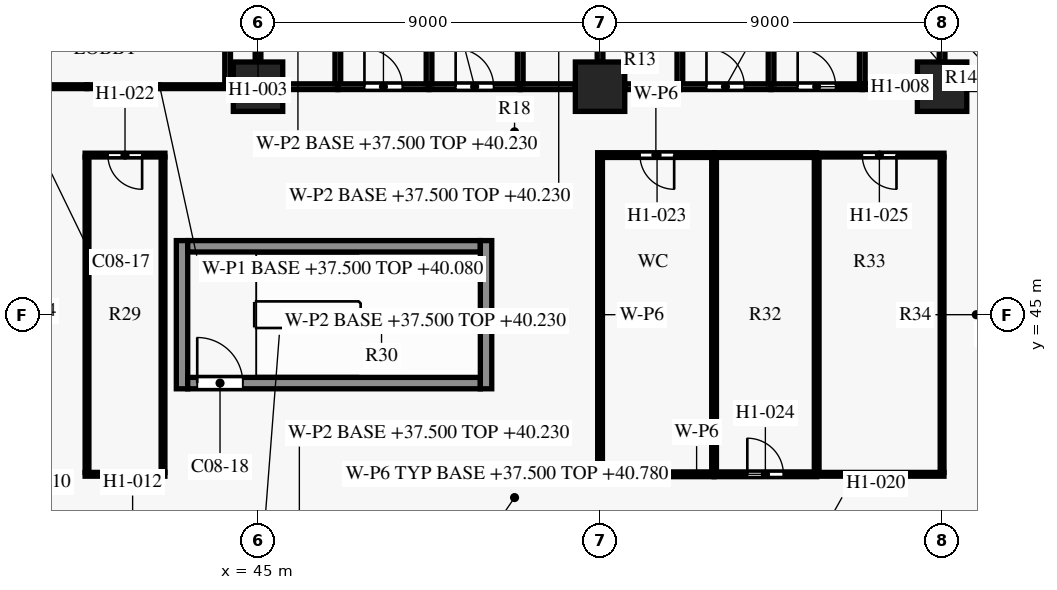
"""IFC4 building model, lengths in metres.
Left out: names, types, materials, properties, quantities, classifications, styles, units other than length and angle.
Written with IfcOpenShell. Run it as: python <this file> out.ifc"""

import sys

from ifc_helpers import new_model, si_unit, direction, frame, frame_2d, origin, origin_2d, place, context, subcontext, project, spatial, rectangle, extrude, element, fill, save


model = new_model("IFC4")
c1 = context("Model", 3, precision=1e-05, world=origin(), true_north=direction((0.0, 1.0)))
c2 = subcontext(c1, "Body", "Model", "MODEL_VIEW")
j1 = project(units=[si_unit("LENGTHUNIT", "METRE"), si_unit("PLANEANGLEUNIT", "RADIAN")], contexts=[c1])
p1 = place(None, origin())
s1 = spatial("IfcSite", under=j1, at=p1, CompositionType="ELEMENT")
p2 = place(p1, origin())
s2 = spatial("IfcBuilding", under=s1, at=p2, CompositionType="ELEMENT")
p3 = place(p2, frame((0.0, 0.0, 37.5)))
s3 = spatial("IfcBuildingStorey", under=s2, at=p3, CompositionType="ELEMENT", Elevation=37.5)
for number, where, z_axis, x_axis in (
    (1, (45.0, 51.0, 0.0), (0.0, 0.0, 1.0), (1.0, 0.0, 0.0)),
    (2, (54.0, 51.0, 0.0), (0.0, 0.0, 1.0), (1.0, 0.0, 0.0)),
    (3, (63.0, 51.0, 0.0), (0.0, 0.0, 1.0), (1.0, 0.0, 0.0)),
):
    element("IfcColumn", number, at=place(p3, frame(where, z_axis=z_axis, x_axis=x_axis)), inside=s3, PredefinedType="COLUMN", context=c2, shape_type="SweptSolid", body=[
        extrude(rectangle(XDim=1.3, YDim=1.3, at=origin_2d()), origin(), (0.0, 0.0, 1.0), 3.6),
    ])
p4 = place(p3, frame((43.15, 43.2, 0.0), z_axis=(0.0, 0.0, 1.0), x_axis=(1.0, 0.0, 0.0)))
e4 = element("IfcWall", 4, at=p4, inside=s3, PredefinedType="SHEAR", context=c2, shape_type="SweptSolid", body=[
    extrude(rectangle(XDim=7.7, YDim=0.3, at=frame_2d((3.85, 0.0))), origin(), (0.0, 0.0, 1.0), 3.3),
])
p5 = place(p4, frame((0.25, 0.0, 0.0)))
e5 = element("IfcOpeningElement", 5, at=p5, cuts=e4, PredefinedType="OPENING", context=c2, shape_type="SweptSolid", body=[
    extrude(rectangle(XDim=1.2, YDim=2.2, at=frame_2d((0.6, 1.1))), frame((0.0, 0.16, 0.0), z_axis=(0.0, -1.0, 0.0), x_axis=(1.0, 0.0, 0.0)), (0.0, 0.0, 1.0), 0.32),
])
p6 = place(p3, frame((43.15, 46.8, 0.0), z_axis=(0.0, 0.0, 1.0), x_axis=(1.0, 0.0, 0.0)))
e6 = element("IfcWall", 6, at=p6, inside=s3, PredefinedType="SHEAR", context=c2, shape_type="SweptSolid", body=[
    extrude(rectangle(XDim=7.7, YDim=0.3, at=frame_2d((3.85, 0.0))), origin(), (0.0, 0.0, 1.0), 3.3),
])
for number, where, z_axis, x_axis in (
    (7, (43.0, 43.05, 0.0), (0.0, 0.0, 1.0), (0.0, 1.0, 0.0)),
    (8, (51.0, 43.05, 0.0), (0.0, 0.0, 1.0), (0.0, 1.0, 0.0)),
):
    element("IfcWall", number, at=place(p3, frame(where, z_axis=z_axis, x_axis=x_axis)), inside=s3, PredefinedType="SHEAR", context=c2, shape_type="SweptSolid", body=[
        extrude(rectangle(XDim=3.9, YDim=0.3, at=frame_2d((1.95, 0.0))), origin(), (0.0, 0.0, 1.0), 3.3),
    ])
p7 = place(p3, frame((40.45, 40.8, 0.0), z_axis=(0.0, 0.0, 1.0), x_axis=(1.0, 0.0, 0.0)))
e9 = element("IfcWall", 9, at=p7, inside=s3, PredefinedType="PARTITIONING", context=c2, shape_type="SweptSolid", body=[
    extrude(rectangle(XDim=2.1, YDim=0.1, at=frame_2d((1.05, 0.0))), origin(), (0.0, 0.0, 1.0), 3.28),
])
p8 = place(p3, frame((53.938, 40.8, 0.0), z_axis=(0.0, 0.0, 1.0), x_axis=(1.0, 0.0, 0.0)))
e10 = element("IfcWall", 10, at=p8, inside=s3, PredefinedType="PARTITIONING", context=c2, shape_type="SweptSolid", body=[
    extrude(rectangle(XDim=3.062, YDim=0.125, at=frame_2d((1.531, 0.0))), origin(), (0.0, 0.0, 1.0), 2.73),
])
p9 = place(p3, frame((57.0, 40.8, 0.0), z_axis=(0.0, 0.0, 1.0), x_axis=(1.0, 0.0, 0.0)))
e11 = element("IfcWall", 11, at=p9, inside=s3, PredefinedType="PARTITIONING", context=c2, shape_type="SweptSolid", body=[
    extrude(rectangle(XDim=2.7, YDim=0.125, at=frame_2d((1.35, 0.0))), origin(), (0.0, 0.0, 1.0), 3.28),
])
p10 = place(p9, frame((0.875, 0.0, 0.0)))
e12 = element("IfcOpeningElement", 12, at=p10, cuts=e11, PredefinedType="OPENING", context=c2, shape_type="SweptSolid", body=[
    extrude(rectangle(XDim=0.95, YDim=2.1, at=frame_2d((0.475, 1.05))), frame((0.0, 0.073, 0.0), z_axis=(0.0, -1.0, 0.0), x_axis=(1.0, 0.0, 0.0)), (0.0, 0.0, 1.0), 0.145),
])
p11 = place(p3, frame((59.7, 40.8, 0.0), z_axis=(0.0, 0.0, 1.0), x_axis=(1.0, 0.0, 0.0)))
e13 = element("IfcWall", 13, at=p11, inside=s3, PredefinedType="PARTITIONING", context=c2, shape_type="SweptSolid", body=[
    extrude(rectangle(XDim=3.35, YDim=0.1, at=frame_2d((1.675, 0.0))), origin(), (0.0, 0.0, 1.0), 2.73),
])
p12 = place(p3, frame((63.0, 40.85, 0.0), z_axis=(0.0, 0.0, 1.0), x_axis=(0.0, 1.0, 0.0)))
e14 = element("IfcWall", 14, at=p12, inside=s3, PredefinedType="PARTITIONING", context=c2, shape_type="SweptSolid", body=[
    extrude(rectangle(XDim=8.3, YDim=0.1, at=frame_2d((4.15, 0.0))), origin(), (0.0, 0.0, 1.0), 2.73),
])
p13 = place(p3, frame((54.0, 49.137, 0.0), z_axis=(0.0, 0.0, 1.0), x_axis=(0.0, -1.0, 0.0)))
e15 = element("IfcWall", 15, at=p13, inside=s3, PredefinedType="PARTITIONING", context=c2, shape_type="SweptSolid", body=[
    extrude(rectangle(XDim=8.275, YDim=0.125, at=frame_2d((4.137, 0.0))), origin(), (0.0, 0.0, 1.0), 2.73),
])
for number, where, z_axis, x_axis in (
    (16, (57.0, 49.137, 0.0), (0.0, 0.0, 1.0), (0.0, -1.0, 0.0)),
    (17, (59.7, 49.137, 0.0), (0.0, 0.0, 1.0), (0.0, -1.0, 0.0)),
):
    element("IfcWall", number, at=place(p3, frame(where, z_axis=z_axis, x_axis=x_axis)), inside=s3, PredefinedType="PARTITIONING", context=c2, shape_type="SweptSolid", body=[
        extrude(rectangle(XDim=8.275, YDim=0.125, at=frame_2d((4.137, 0.0))), origin(), (0.0, 0.0, 1.0), 3.28),
    ])
for number, where, z_axis, x_axis in (
    (18, (40.5, 49.15, 0.0), (0.0, 0.0, 1.0), (0.0, -1.0, 0.0)),
    (19, (42.5, 49.15, 0.0), (0.0, 0.0, 1.0), (0.0, -1.0, 0.0)),
):
    element("IfcWall", number, at=place(p3, frame(where, z_axis=z_axis, x_axis=x_axis)), inside=s3, PredefinedType="PARTITIONING", context=c2, shape_type="SweptSolid", body=[
        extrude(rectangle(XDim=8.3, YDim=0.1, at=frame_2d((4.15, 0.0))), origin(), (0.0, 0.0, 1.0), 3.28),
    ])
p14 = place(p3, frame((42.55, 49.2, 0.0), z_axis=(0.0, 0.0, 1.0), x_axis=(-1.0, 0.0, 0.0)))
e20 = element("IfcWall", 20, at=p14, inside=s3, PredefinedType="PARTITIONING", context=c2, shape_type="SweptSolid", body=[
    extrude(rectangle(XDim=2.1, YDim=0.1, at=frame_2d((1.05, 0.0))), origin(), (0.0, 0.0, 1.0), 3.28),
])
p15 = place(p14, frame((0.6, 0.0, 0.0)))
e21 = element("IfcOpeningElement", 21, at=p15, cuts=e20, PredefinedType="OPENING", context=c2, shape_type="SweptSolid", body=[
    extrude(rectangle(XDim=0.9, YDim=2.1, at=frame_2d((0.45, 1.05))), frame((0.0, 0.06, 0.0), z_axis=(0.0, -1.0, 0.0), x_axis=(1.0, 0.0, 0.0)), (0.0, 0.0, 1.0), 0.12),
])
p16 = place(p3, frame((57.0, 49.2, 0.0), z_axis=(0.0, 0.0, 1.0), x_axis=(-1.0, 0.0, 0.0)))
e22 = element("IfcWall", 22, at=p16, inside=s3, PredefinedType="PARTITIONING", context=c2, shape_type="SweptSolid", body=[
    extrude(rectangle(XDim=3.062, YDim=0.125, at=frame_2d((1.531, 0.0))), origin(), (0.0, 0.0, 1.0), 2.73),
])
p17 = place(p16, frame((1.05, 0.0, 0.0)))
e23 = element("IfcOpeningElement", 23, at=p17, cuts=e22, PredefinedType="OPENING", context=c2, shape_type="SweptSolid", body=[
    extrude(rectangle(XDim=0.9, YDim=2.1, at=frame_2d((0.45, 1.05))), frame((0.0, 0.073, 0.0), z_axis=(0.0, -1.0, 0.0), x_axis=(1.0, 0.0, 0.0)), (0.0, 0.0, 1.0), 0.145),
])
p18 = place(p3, frame((59.7, 49.2, 0.0), z_axis=(0.0, 0.0, 1.0), x_axis=(-1.0, 0.0, 0.0)))
e24 = element("IfcWall", 24, at=p18, inside=s3, PredefinedType="PARTITIONING", context=c2, shape_type="SweptSolid", body=[
    extrude(rectangle(XDim=2.7, YDim=0.125, at=frame_2d((1.35, 0.0))), origin(), (0.0, 0.0, 1.0), 3.28),
])
p19 = place(p3, frame((63.05, 49.2, 0.0), z_axis=(0.0, 0.0, 1.0), x_axis=(-1.0, 0.0, 0.0)))
e25 = element("IfcWall", 25, at=p19, inside=s3, PredefinedType="PARTITIONING", context=c2, shape_type="SweptSolid", body=[
    extrude(rectangle(XDim=3.35, YDim=0.1, at=frame_2d((1.675, 0.0))), origin(), (0.0, 0.0, 1.0), 2.73),
])
p20 = place(p19, frame((1.25, 0.0, 0.0)))
e26 = element("IfcOpeningElement", 26, at=p20, cuts=e25, PredefinedType="OPENING", context=c2, shape_type="SweptSolid", body=[
    extrude(rectangle(XDim=0.9, YDim=2.1, at=frame_2d((0.45, 1.05))), frame((0.0, 0.06, 0.0), z_axis=(0.0, -1.0, 0.0), x_axis=(1.0, 0.0, 0.0)), (0.0, 0.0, 1.0), 0.12),
])
p21 = place(p3, frame((40.5, 51.0, 0.0), z_axis=(0.0, 0.0, 1.0), x_axis=(-1.0, 0.0, 0.0)))
e27 = element("IfcWall", 27, at=p21, inside=s3, PredefinedType="PARTITIONING", context=c2, shape_type="SweptSolid", body=[
    extrude(rectangle(XDim=3.845, YDim=0.1, at=frame_2d((1.922, 0.0))), origin(), (0.0, 0.0, 1.0), 2.58),
])
p22 = place(p21, frame((1.8, 0.0, 0.0)))
e28 = element("IfcOpeningElement", 28, at=p22, cuts=e27, PredefinedType="OPENING", context=c2, shape_type="SweptSolid", body=[
    extrude(rectangle(XDim=0.9, YDim=2.1, at=frame_2d((0.45, 1.05))), frame((0.0, 0.06, 0.0), z_axis=(0.0, -1.0, 0.0), x_axis=(1.0, 0.0, 0.0)), (0.0, 0.0, 1.0), 0.12),
])
p23 = place(p3, frame((44.33, 51.0, 0.0), z_axis=(0.0, 0.0, 1.0), x_axis=(-1.0, 0.0, 0.0)))
e29 = element("IfcWall", 29, at=p23, inside=s3, PredefinedType="PARTITIONING", context=c2, shape_type="SweptSolid", body=[
    extrude(rectangle(XDim=3.83, YDim=0.1, at=frame_2d((1.915, 0.0))), origin(), (0.0, 0.0, 1.0), 2.58),
])
p24 = place(p3, frame((45.655, 51.0, 0.0), z_axis=(0.0, 0.0, 1.0), x_axis=(1.0, 0.0, 0.0)))
e30 = element("IfcWall", 30, at=p24, inside=s3, PredefinedType="PARTITIONING", context=c2, shape_type="SweptSolid", body=[
    extrude(rectangle(XDim=1.445, YDim=0.15, at=frame_2d((0.723, 0.0))), origin(), (0.0, 0.0, 1.0), 2.58),
])
p25 = place(p3, frame((47.1, 51.0, 0.0), z_axis=(0.0, 0.0, 1.0), x_axis=(1.0, 0.0, 0.0)))
e31 = element("IfcWall", 31, at=p25, inside=s3, PredefinedType="PARTITIONING", context=c2, shape_type="SweptSolid", body=[
    extrude(rectangle(XDim=2.4, YDim=0.15, at=frame_2d((1.2, 0.0))), origin(), (0.0, 0.0, 1.0), 2.58),
])
p26 = place(p25, frame((0.7, 0.0, 0.0)))
e32 = element("IfcOpeningElement", 32, at=p26, cuts=e31, PredefinedType="OPENING", context=c2, shape_type="SweptSolid", body=[
    extrude(rectangle(XDim=1.0, YDim=2.1, at=frame_2d((0.5, 1.05))), frame((0.0, 0.085, 0.0), z_axis=(0.0, -1.0, 0.0), x_axis=(1.0, 0.0, 0.0)), (0.0, 0.0, 1.0), 0.17),
])
p27 = place(p3, frame((49.5, 51.0, 0.0), z_axis=(0.0, 0.0, 1.0), x_axis=(1.0, 0.0, 0.0)))
e33 = element("IfcWall", 33, at=p27, inside=s3, PredefinedType="PARTITIONING", context=c2, shape_type="SweptSolid", body=[
    extrude(rectangle(XDim=2.4, YDim=0.15, at=frame_2d((1.2, 0.0))), origin(), (0.0, 0.0, 1.0), 2.58),
])
p28 = place(p27, frame((0.7, 0.0, 0.0)))
e34 = element("IfcOpeningElement", 34, at=p28, cuts=e33, PredefinedType="OPENING", context=c2, shape_type="SweptSolid", body=[
    extrude(rectangle(XDim=1.0, YDim=2.1, at=frame_2d((0.5, 1.05))), frame((0.0, 0.085, 0.0), z_axis=(0.0, -1.0, 0.0), x_axis=(1.0, 0.0, 0.0)), (0.0, 0.0, 1.0), 0.17),
])
for number, where, z_axis, x_axis in (
    (35, (51.9, 51.0, 0.0), (0.0, 0.0, 1.0), (1.0, 0.0, 0.0)),
    (36, (54.655, 51.0, 0.0), (0.0, 0.0, 1.0), (1.0, 0.0, 0.0)),
):
    element("IfcWall", number, at=place(p3, frame(where, z_axis=z_axis, x_axis=x_axis)), inside=s3, PredefinedType="PARTITIONING", context=c2, shape_type="SweptSolid", body=[
        extrude(rectangle(XDim=1.445, YDim=0.15, at=frame_2d((0.723, 0.0))), origin(), (0.0, 0.0, 1.0), 2.58),
    ])
p29 = place(p3, frame((56.1, 51.0, 0.0), z_axis=(0.0, 0.0, 1.0), x_axis=(1.0, 0.0, 0.0)))
e37 = element("IfcWall", 37, at=p29, inside=s3, PredefinedType="PARTITIONING", context=c2, shape_type="SweptSolid", body=[
    extrude(rectangle(XDim=2.4, YDim=0.15, at=frame_2d((1.2, 0.0))), origin(), (0.0, 0.0, 1.0), 2.58),
])
p30 = place(p29, frame((0.7, 0.0, 0.0)))
e38 = element("IfcOpeningElement", 38, at=p30, cuts=e37, PredefinedType="OPENING", context=c2, shape_type="SweptSolid", body=[
    extrude(rectangle(XDim=1.0, YDim=2.1, at=frame_2d((0.5, 1.05))), frame((0.0, 0.085, 0.0), z_axis=(0.0, -1.0, 0.0), x_axis=(1.0, 0.0, 0.0)), (0.0, 0.0, 1.0), 0.17),
])
p31 = place(p3, frame((58.5, 51.0, 0.0), z_axis=(0.0, 0.0, 1.0), x_axis=(1.0, 0.0, 0.0)))
e39 = element("IfcWall", 39, at=p31, inside=s3, PredefinedType="PARTITIONING", context=c2, shape_type="SweptSolid", body=[
    extrude(rectangle(XDim=2.4, YDim=0.15, at=frame_2d((1.2, 0.0))), origin(), (0.0, 0.0, 1.0), 2.58),
])
p32 = place(p31, frame((0.7, 0.0, 0.0)))
e40 = element("IfcOpeningElement", 40, at=p32, cuts=e39, PredefinedType="OPENING", context=c2, shape_type="SweptSolid", body=[
    extrude(rectangle(XDim=1.0, YDim=2.1, at=frame_2d((0.5, 1.05))), frame((0.0, 0.085, 0.0), z_axis=(0.0, -1.0, 0.0), x_axis=(1.0, 0.0, 0.0)), (0.0, 0.0, 1.0), 0.17),
])
p33 = place(p3, frame((60.9, 51.0, 0.0), z_axis=(0.0, 0.0, 1.0), x_axis=(1.0, 0.0, 0.0)))
e41 = element("IfcWall", 41, at=p33, inside=s3, PredefinedType="PARTITIONING", context=c2, shape_type="SweptSolid", body=[
    extrude(rectangle(XDim=1.445, YDim=0.15, at=frame_2d((0.723, 0.0))), origin(), (0.0, 0.0, 1.0), 2.58),
])
p34 = place(p3, frame((63.655, 51.0, 0.0), z_axis=(0.0, 0.0, 1.0), x_axis=(1.0, 0.0, 0.0)))
e42 = element("IfcWall", 42, at=p34, inside=s3, PredefinedType="PARTITIONING", context=c2, shape_type="SweptSolid", body=[
    extrude(rectangle(XDim=1.22, YDim=0.15, at=frame_2d((0.61, 0.0))), origin(), (0.0, 0.0, 1.0), 2.58),
])
p35 = place(p3, frame((47.1, 51.075, 0.0), z_axis=(0.0, 0.0, 1.0), x_axis=(0.0, 1.0, 0.0)))
e43 = element("IfcWall", 43, at=p35, inside=s3, PredefinedType="PARTITIONING", context=c2, shape_type="SweptSolid", body=[
    extrude(rectangle(XDim=2.85, YDim=0.15, at=frame_2d((1.425, 0.0))), origin(), (0.0, 0.0, 1.0), 2.58),
])
p36 = place(p3, frame((56.1, 51.075, 0.0), z_axis=(0.0, 0.0, 1.0), x_axis=(0.0, 1.0, 0.0)))
e44 = element("IfcWall", 44, at=p36, inside=s3, PredefinedType="PARTITIONING", context=c2, shape_type="SweptSolid", body=[
    extrude(rectangle(XDim=2.85, YDim=0.15, at=frame_2d((1.425, 0.0))), origin(), (0.0, 0.0, 1.0), 2.58),
])
p37 = place(p36, frame((1.025, 0.0, 0.0)))
e45 = element("IfcOpeningElement", 45, at=p37, cuts=e44, PredefinedType="OPENING", context=c2, shape_type="SweptSolid", body=[
    extrude(rectangle(XDim=0.8, YDim=2.1, at=frame_2d((0.4, 1.05))), frame((0.0, 0.085, 0.0), z_axis=(0.0, -1.0, 0.0), x_axis=(1.0, 0.0, 0.0)), (0.0, 0.0, 1.0), 0.17),
])
p38 = place(p3, frame((44.2, 53.7, 0.0), z_axis=(0.0, 0.0, 1.0), x_axis=(0.0, -1.0, 0.0)))
e46 = element("IfcWall", 46, at=p38, inside=s3, PredefinedType="PARTITIONING", context=c2, shape_type="SweptSolid", body=[
    extrude(rectangle(XDim=2.625, YDim=0.15, at=frame_2d((1.312, 0.0))), origin(), (0.0, 0.0, 1.0), 2.58),
])
p39 = place(p3, frame((45.0, 53.925, 0.0), z_axis=(0.0, 0.0, 1.0), x_axis=(0.0, -1.0, 0.0)))
e47 = element("IfcWall", 47, at=p39, inside=s3, PredefinedType="PARTITIONING", context=c2, shape_type="SweptSolid", body=[
    extrude(rectangle(XDim=2.27, YDim=0.15, at=frame_2d((1.135, 0.0))), origin(), (0.0, 0.0, 1.0), 2.73),
])
p40 = place(p39, frame((1.025, 0.0, 0.0)))
e48 = element("IfcOpeningElement", 48, at=p40, cuts=e47, PredefinedType="OPENING", context=c2, shape_type="SweptSolid", body=[
    extrude(rectangle(XDim=0.8, YDim=2.1, at=frame_2d((0.4, 1.05))), frame((0.0, 0.085, 0.0), z_axis=(0.0, -1.0, 0.0), x_axis=(1.0, 0.0, 0.0)), (0.0, 0.0, 1.0), 0.17),
])
p41 = place(p3, frame((51.9, 53.925, 0.0), z_axis=(0.0, 0.0, 1.0), x_axis=(0.0, -1.0, 0.0)))
e49 = element("IfcWall", 49, at=p41, inside=s3, PredefinedType="PARTITIONING", context=c2, shape_type="SweptSolid", body=[
    extrude(rectangle(XDim=2.85, YDim=0.15, at=frame_2d((1.425, 0.0))), origin(), (0.0, 0.0, 1.0), 2.58),
])
p42 = place(p41, frame((1.025, 0.0, 0.0)))
e50 = element("IfcOpeningElement", 50, at=p42, cuts=e49, PredefinedType="OPENING", context=c2, shape_type="SweptSolid", body=[
    extrude(rectangle(XDim=0.8, YDim=2.1, at=frame_2d((0.4, 1.05))), frame((0.0, 0.085, 0.0), z_axis=(0.0, -1.0, 0.0), x_axis=(1.0, 0.0, 0.0)), (0.0, 0.0, 1.0), 0.17),
])
p43 = place(p3, frame((54.0, 53.925, 0.0), z_axis=(0.0, 0.0, 1.0), x_axis=(0.0, -1.0, 0.0)))
e51 = element("IfcWall", 51, at=p43, inside=s3, PredefinedType="PARTITIONING", context=c2, shape_type="SweptSolid", body=[
    extrude(rectangle(XDim=2.27, YDim=0.15, at=frame_2d((1.135, 0.0))), origin(), (0.0, 0.0, 1.0), 2.73),
])
p44 = place(p3, frame((60.9, 53.925, 0.0), z_axis=(0.0, 0.0, 1.0), x_axis=(0.0, -1.0, 0.0)))
e52 = element("IfcWall", 52, at=p44, inside=s3, PredefinedType="PARTITIONING", context=c2, shape_type="SweptSolid", body=[
    extrude(rectangle(XDim=2.85, YDim=0.15, at=frame_2d((1.425, 0.0))), origin(), (0.0, 0.0, 1.0), 2.58),
])
p45 = place(p44, frame((1.025, 0.0, 0.0)))
e53 = element("IfcOpeningElement", 53, at=p45, cuts=e52, PredefinedType="OPENING", context=c2, shape_type="SweptSolid", body=[
    extrude(rectangle(XDim=0.8, YDim=2.1, at=frame_2d((0.4, 1.05))), frame((0.0, 0.085, 0.0), z_axis=(0.0, -1.0, 0.0), x_axis=(1.0, 0.0, 0.0)), (0.0, 0.0, 1.0), 0.17),
])
p46 = place(p3, frame((63.0, 53.925, 0.0), z_axis=(0.0, 0.0, 1.0), x_axis=(0.0, -1.0, 0.0)))
e54 = element("IfcWall", 54, at=p46, inside=s3, PredefinedType="PARTITIONING", context=c2, shape_type="SweptSolid", body=[
    extrude(rectangle(XDim=2.27, YDim=0.15, at=frame_2d((1.135, 0.0))), origin(), (0.0, 0.0, 1.0), 2.73),
])
for number, where, z_axis, x_axis in (
    (55, (49.5, 62.425, 0.0), (0.0, 0.0, 1.0), (0.0, -1.0, 0.0)),
    (56, (58.5, 62.425, 0.0), (0.0, 0.0, 1.0), (0.0, -1.0, 0.0)),
):
    element("IfcWall", number, at=place(p3, frame(where, z_axis=z_axis, x_axis=x_axis)), inside=s3, PredefinedType="PARTITIONING", context=c2, shape_type="SweptSolid", body=[
        extrude(rectangle(XDim=11.35, YDim=0.15, at=frame_2d((5.675, 0.0))), origin(), (0.0, 0.0, 1.0), 2.58),
    ])
p47 = place(p5, origin())
e57 = element("IfcDoor", 57, at=p47, inside=s3, OperationType="SINGLE_SWING_RIGHT", PredefinedType="DOOR", context=c2, shape_type="SweptSolid", body=[
    extrude(rectangle(XDim=1.2, YDim=2.2, at=frame_2d((0.6, 1.1))), frame((0.0, 0.025, 0.0), z_axis=(0.0, -1.0, 0.0), x_axis=(1.0, 0.0, 0.0)), (0.0, 0.0, 1.0), 0.05),
])
fill(e5, e57)
p48 = place(p26, origin())
e58 = element("IfcDoor", 58, at=p48, inside=s3, OperationType="SINGLE_SWING_LEFT", PredefinedType="DOOR", context=c2, shape_type="SweptSolid", body=[
    extrude(rectangle(XDim=1.0, YDim=2.1, at=frame_2d((0.5, 1.05))), frame((0.0, 0.025, 0.0), z_axis=(0.0, -1.0, 0.0), x_axis=(1.0, 0.0, 0.0)), (0.0, 0.0, 1.0), 0.05),
])
fill(e32, e58)
p49 = place(p28, origin())
e59 = element("IfcDoor", 59, at=p49, inside=s3, OperationType="SINGLE_SWING_LEFT", PredefinedType="DOOR", context=c2, shape_type="SweptSolid", body=[
    extrude(rectangle(XDim=1.0, YDim=2.1, at=frame_2d((0.5, 1.05))), frame((0.0, 0.025, 0.0), z_axis=(0.0, -1.0, 0.0), x_axis=(1.0, 0.0, 0.0)), (0.0, 0.0, 1.0), 0.05),
])
fill(e34, e59)
p50 = place(p30, origin())
e60 = element("IfcDoor", 60, at=p50, inside=s3, OperationType="SINGLE_SWING_LEFT", PredefinedType="DOOR", context=c2, shape_type="SweptSolid", body=[
    extrude(rectangle(XDim=1.0, YDim=2.1, at=frame_2d((0.5, 1.05))), frame((0.0, 0.025, 0.0), z_axis=(0.0, -1.0, 0.0), x_axis=(1.0, 0.0, 0.0)), (0.0, 0.0, 1.0), 0.05),
])
fill(e38, e60)
p51 = place(p32, origin())
e61 = element("IfcDoor", 61, at=p51, inside=s3, OperationType="SINGLE_SWING_LEFT", PredefinedType="DOOR", context=c2, shape_type="SweptSolid", body=[
    extrude(rectangle(XDim=1.0, YDim=2.1, at=frame_2d((0.5, 1.05))), frame((0.0, 0.025, 0.0), z_axis=(0.0, -1.0, 0.0), x_axis=(1.0, 0.0, 0.0)), (0.0, 0.0, 1.0), 0.05),
])
fill(e40, e61)
p52 = place(p15, origin())
e62 = element("IfcDoor", 62, at=p52, inside=s3, OperationType="SINGLE_SWING_LEFT", PredefinedType="DOOR", context=c2, shape_type="SweptSolid", body=[
    extrude(rectangle(XDim=0.9, YDim=2.1, at=frame_2d((0.45, 1.05))), frame((0.0, 0.025, 0.0), z_axis=(0.0, -1.0, 0.0), x_axis=(1.0, 0.0, 0.0)), (0.0, 0.0, 1.0), 0.05),
])
fill(e21, e62)
p53 = place(p17, origin())
e63 = element("IfcDoor", 63, at=p53, inside=s3, OperationType="SINGLE_SWING_LEFT", PredefinedType="DOOR", context=c2, shape_type="SweptSolid", body=[
    extrude(rectangle(XDim=0.9, YDim=2.1, at=frame_2d((0.45, 1.05))), frame((0.0, 0.025, 0.0), z_axis=(0.0, -1.0, 0.0), x_axis=(1.0, 0.0, 0.0)), (0.0, 0.0, 1.0), 0.05),
])
fill(e23, e63)
p54 = place(p10, origin())
e64 = element("IfcDoor", 64, at=p54, inside=s3, OperationType="SINGLE_SWING_LEFT", PredefinedType="DOOR", context=c2, shape_type="SweptSolid", body=[
    extrude(rectangle(XDim=0.95, YDim=2.1, at=frame_2d((0.475, 1.05))), frame((0.0, 0.025, 0.0), z_axis=(0.0, -1.0, 0.0), x_axis=(1.0, 0.0, 0.0)), (0.0, 0.0, 1.0), 0.05),
])
fill(e12, e64)
p55 = place(p20, origin())
e65 = element("IfcDoor", 65, at=p55, inside=s3, OperationType="SINGLE_SWING_LEFT", PredefinedType="DOOR", context=c2, shape_type="SweptSolid", body=[
    extrude(rectangle(XDim=0.9, YDim=2.1, at=frame_2d((0.45, 1.05))), frame((0.0, 0.025, 0.0), z_axis=(0.0, -1.0, 0.0), x_axis=(1.0, 0.0, 0.0)), (0.0, 0.0, 1.0), 0.05),
])
fill(e26, e65)
save(model, sys.argv[1])
